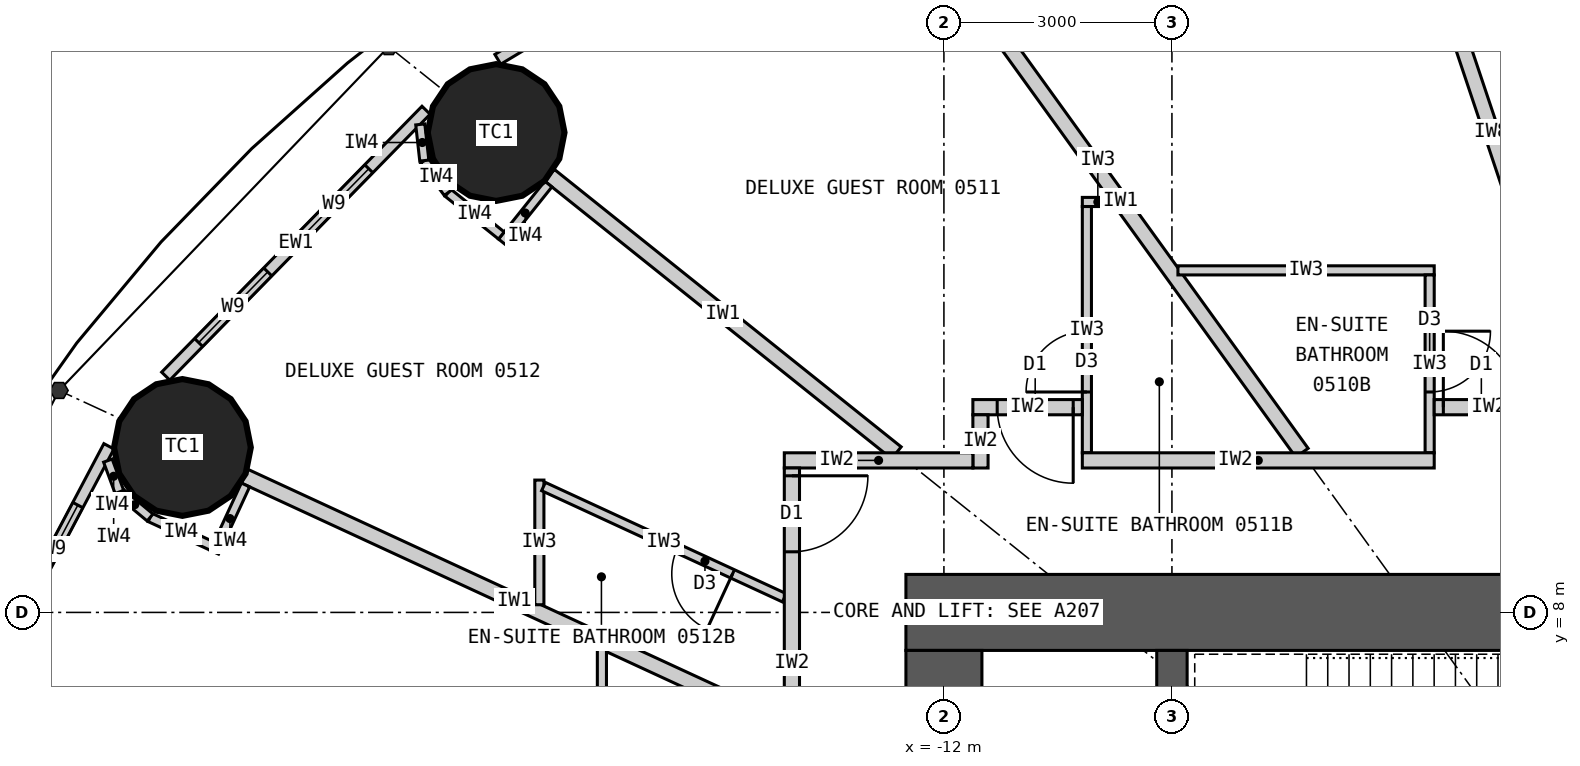
"""IFC4 building model, lengths in metres.
Left out: names, types, materials, properties, quantities, classifications, styles, units other than length and angle.
Written with IfcOpenShell. Run it as: python <this file> out.ifc"""

import sys

from ifc_helpers import new_model, si_unit, direction, frame, frame_2d, origin, origin_2d, place, context, subcontext, project, spatial, rectangle, circle, extrude, element, fill, save


model = new_model("IFC4")
c1 = context("Model", 3, precision=1e-05, world=origin(), true_north=direction((0.0, 1.0)))
c2 = subcontext(c1, "Body", "Model", "MODEL_VIEW")
j1 = project(units=[si_unit("LENGTHUNIT", "METRE"), si_unit("PLANEANGLEUNIT", "RADIAN")], contexts=[c1])
p1 = place(None, origin())
s1 = spatial("IfcSite", under=j1, at=p1, CompositionType="ELEMENT")
p2 = place(p1, origin())
s2 = spatial("IfcBuilding", under=s1, at=p2, CompositionType="ELEMENT")
p3 = place(p2, frame((0.0, 0.0, 29.4)))
s3 = spatial("IfcBuildingStorey", under=s2, at=p3, CompositionType="ELEMENT", Elevation=29.4)
for number, where, z_axis, x_axis in (
    (1, (-17.892, 14.313, 0.0), (0.0, 0.0, 1.0), (1.0, 0.0, 0.0)),
    (2, (-22.019, 10.17, 0.0), (0.0, 0.0, 1.0), (1.0, 0.0, 0.0)),
):
    element("IfcColumn", number, at=place(p3, frame(where, z_axis=z_axis, x_axis=x_axis)), inside=s3, PredefinedType="COLUMN", context=c2, shape_type="SweptSolid", body=[
        extrude(circle(Radius=0.9, at=origin_2d()), origin(), (0.0, 0.0, 1.0), 3.3),
    ])
p4 = place(p3, frame((-12.5, 8.0, 0.0), z_axis=(0.0, 0.0, 1.0), x_axis=(1.0, 0.0, 0.0)))
e3 = element("IfcWall", 3, at=p4, inside=s3, PredefinedType="SHEAR", context=c2, shape_type="SweptSolid", body=[
    extrude(rectangle(XDim=25.0, YDim=1.0, at=frame_2d((12.5, 0.0))), origin(), (0.0, 0.0, 1.0), 3.3),
])
p5 = place(p4, frame((11.2, 0.0, 0.0)))
e4 = element("IfcOpeningElement", 4, at=p5, cuts=e3, PredefinedType="OPENING", context=c2, shape_type="SweptSolid", body=[
    extrude(rectangle(XDim=1.2, YDim=2.2, at=frame_2d((0.6, 1.1))), frame((0.0, 0.51, 0.0), z_axis=(0.0, -1.0, 0.0), x_axis=(1.0, 0.0, 0.0)), (0.0, 0.0, 1.0), 1.02),
])
p6 = place(p4, frame((18.8, 0.0, 0.0)))
e5 = element("IfcOpeningElement", 5, at=p6, cuts=e3, PredefinedType="OPENING", context=c2, shape_type="SweptSolid", body=[
    extrude(rectangle(XDim=0.9, YDim=2.2, at=frame_2d((0.45, 1.1))), frame((0.0, 0.51, 0.0), z_axis=(0.0, -1.0, 0.0), x_axis=(1.0, 0.0, 0.0)), (0.0, 0.0, 1.0), 1.02),
])
p7 = place(p3, frame((-12.0, 7.5, 0.0), z_axis=(0.0, 0.0, 1.0), x_axis=(0.0, -1.0, 0.0)))
e6 = element("IfcWall", 6, at=p7, inside=s3, PredefinedType="SHEAR", context=c2, shape_type="SweptSolid", body=[
    extrude(rectangle(XDim=15.0, YDim=1.0, at=frame_2d((7.5, 0.0))), origin(), (0.0, 0.0, 1.0), 3.3),
])
p8 = place(p7, frame((6.6, 0.0, 0.0)))
e7 = element("IfcOpeningElement", 7, at=p8, cuts=e6, PredefinedType="OPENING", context=c2, shape_type="SweptSolid", body=[
    extrude(rectangle(XDim=1.8, YDim=2.2, at=frame_2d((0.9, 1.1))), frame((0.0, 0.51, 0.0), z_axis=(0.0, -1.0, 0.0), x_axis=(1.0, 0.0, 0.0)), (0.0, 0.0, 1.0), 1.02),
])
p9 = place(p3, frame((-9.0, 4.5, 0.0), z_axis=(0.0, 0.0, 1.0), x_axis=(0.0, 1.0, 0.0)))
e8 = element("IfcWall", 8, at=p9, inside=s3, PredefinedType="SHEAR", context=c2, shape_type="SweptSolid", body=[
    extrude(rectangle(XDim=3.0, YDim=0.4, at=frame_2d((1.5, 0.0))), origin(), (0.0, 0.0, 1.0), 3.3),
])
p10 = place(p3, frame((-13.412, 17.957, 0.0), z_axis=(0.0, 0.0, 1.0), x_axis=(-0.856958191554, -0.515385931054, 0.0)))
e9 = element("IfcWall", 9, at=p10, inside=s3, PredefinedType="ELEMENTEDWALL", context=c2, shape_type="SweptSolid", body=[
    extrude(rectangle(XDim=5.201, YDim=0.15, at=frame_2d((2.601, 0.0))), origin(), (0.0, 0.0, 1.0), 3.12),
])
p11 = place(p10, frame((1.225, 0.0, 0.9)))
e10 = element("IfcOpeningElement", 10, at=p11, cuts=e9, PredefinedType="OPENING", context=c2, shape_type="SweptSolid", body=[
    extrude(rectangle(XDim=1.3, YDim=1.9, at=frame_2d((0.65, 0.95))), frame((0.0, 0.085, 0.0), z_axis=(0.0, -1.0, 0.0), x_axis=(1.0, 0.0, 0.0)), (0.0, 0.0, 1.0), 0.17),
])
p12 = place(p10, frame((3.125, 0.0, 0.9)))
e11 = element("IfcOpeningElement", 11, at=p12, cuts=e9, PredefinedType="OPENING", context=c2, shape_type="SweptSolid", body=[
    extrude(rectangle(XDim=1.3, YDim=1.9, at=frame_2d((0.65, 0.95))), frame((0.0, 0.085, 0.0), z_axis=(0.0, -1.0, 0.0), x_axis=(1.0, 0.0, 0.0)), (0.0, 0.0, 1.0), 0.17),
])
p13 = place(p3, frame((-18.813, 14.607, 0.0), z_axis=(0.0, 0.0, 1.0), x_axis=(-0.699612594083, -0.714522370679, 0.0)))
e12 = element("IfcWall", 12, at=p13, inside=s3, PredefinedType="ELEMENTEDWALL", context=c2, shape_type="SweptSolid", body=[
    extrude(rectangle(XDim=4.896, YDim=0.15, at=frame_2d((2.448, 0.0))), origin(), (0.0, 0.0, 1.0), 3.12),
])
p14 = place(p13, frame((1.077, 0.0, 0.9)))
e13 = element("IfcOpeningElement", 13, at=p14, cuts=e12, PredefinedType="OPENING", context=c2, shape_type="SweptSolid", body=[
    extrude(rectangle(XDim=1.3, YDim=1.9, at=frame_2d((0.65, 0.95))), frame((0.0, 0.085, 0.0), z_axis=(0.0, -1.0, 0.0), x_axis=(1.0, 0.0, 0.0)), (0.0, 0.0, 1.0), 0.17),
])
p15 = place(p13, frame((2.977, 0.0, 0.9)))
e14 = element("IfcOpeningElement", 14, at=p15, cuts=e12, PredefinedType="OPENING", context=c2, shape_type="SweptSolid", body=[
    extrude(rectangle(XDim=1.3, YDim=1.9, at=frame_2d((0.65, 0.95))), frame((0.0, 0.085, 0.0), z_axis=(0.0, -1.0, 0.0), x_axis=(1.0, 0.0, 0.0)), (0.0, 0.0, 1.0), 0.17),
])
p16 = place(p3, frame((-22.986, 10.185, 0.0), z_axis=(0.0, 0.0, 1.0), x_axis=(-0.467303182954, -0.884097129959, 0.0)))
e15 = element("IfcWall", 15, at=p16, inside=s3, PredefinedType="ELEMENTEDWALL", context=c2, shape_type="SweptSolid", body=[
    extrude(rectangle(XDim=4.606, YDim=0.15, at=frame_2d((2.303, 0.0))), origin(), (0.0, 0.0, 1.0), 3.12),
])
p17 = place(p16, frame((0.875, 0.0, 0.9)))
e16 = element("IfcOpeningElement", 16, at=p17, cuts=e15, PredefinedType="OPENING", context=c2, shape_type="SweptSolid", body=[
    extrude(rectangle(XDim=1.3, YDim=1.9, at=frame_2d((0.65, 0.95))), frame((0.0, 0.085, 0.0), z_axis=(0.0, -1.0, 0.0), x_axis=(1.0, 0.0, 0.0)), (0.0, 0.0, 1.0), 0.17),
])
p18 = place(p16, frame((2.775, 0.0, 0.9)))
e17 = element("IfcOpeningElement", 17, at=p18, cuts=e15, PredefinedType="OPENING", context=c2, shape_type="SweptSolid", body=[
    extrude(rectangle(XDim=1.3, YDim=1.9, at=frame_2d((0.65, 0.95))), frame((0.0, 0.085, 0.0), z_axis=(0.0, -1.0, 0.0), x_axis=(1.0, 0.0, 0.0)), (0.0, 0.0, 1.0), 0.17),
])
p19 = place(p3, frame((-3.383, 10.1, 0.0), z_axis=(0.0, 0.0, 1.0), x_axis=(-0.317593727596, 0.948226884344, 0.0)))
e18 = element("IfcWall", 18, at=p19, inside=s3, PredefinedType="PARTITIONING", context=c2, shape_type="SweptSolid", body=[
    extrude(rectangle(XDim=8.899, YDim=0.2, at=frame_2d((4.449, 0.0))), origin(), (0.0, 0.0, 1.0), 2.32),
])
p20 = place(p3, frame((-7.289, 10.1, 0.0), z_axis=(0.0, 0.0, 1.0), x_axis=(-0.585216319319, 0.810877216108, 0.0)))
e19 = element("IfcWall", 19, at=p20, inside=s3, PredefinedType="PARTITIONING", context=c2, shape_type="SweptSolid", body=[
    extrude(rectangle(XDim=8.16, YDim=0.2, at=frame_2d((4.08, 0.0))), origin(), (0.0, 0.0, 1.0), 2.32),
])
p21 = place(p3, frame((-12.625, 10.1, 0.0), z_axis=(0.0, 0.0, 1.0), x_axis=(-0.780872884676, 0.624689953479, 0.0)))
e20 = element("IfcWall", 20, at=p21, inside=s3, PredefinedType="PARTITIONING", context=c2, shape_type="SweptSolid", body=[
    extrude(rectangle(XDim=5.845, YDim=0.2, at=frame_2d((2.922, 0.0))), origin(), (0.0, 0.0, 1.0), 2.32),
])
p22 = place(p3, frame((-14.1, 6.512, 0.0), z_axis=(0.0, 0.0, 1.0), x_axis=(-0.907842433118, 0.41931147925, 0.0)))
e21 = element("IfcWall", 21, at=p22, inside=s3, PredefinedType="PARTITIONING", context=c2, shape_type="SweptSolid", body=[
    extrude(rectangle(XDim=7.823, YDim=0.2, at=frame_2d((3.912, 0.0))), origin(), (0.0, 0.0, 1.0), 2.32),
])
p23 = place(p3, frame((-8.921, 12.5, 0.0), z_axis=(0.0, 0.0, 1.0), x_axis=(1.0, 0.0, 0.0)))
e22 = element("IfcWall", 22, at=p23, inside=s3, PredefinedType="PARTITIONING", context=c2, shape_type="SweptSolid", body=[
    extrude(rectangle(XDim=3.372, YDim=0.12, at=frame_2d((1.686, 0.0))), origin(), (0.0, 0.0, 1.0), 3.12),
])
p24 = place(p3, frame((-5.609, 10.1, 0.0), z_axis=(0.0, 0.0, 1.0), x_axis=(0.0, 1.0, 0.0)))
e23 = element("IfcWall", 23, at=p24, inside=s3, PredefinedType="PARTITIONING", context=c2, shape_type="SweptSolid", body=[
    extrude(rectangle(XDim=2.34, YDim=0.12, at=frame_2d((1.17, 0.0))), origin(), (0.0, 0.0, 1.0), 3.12),
])
p25 = place(p24, frame((0.8, 0.0, 0.0)))
e24 = element("IfcOpeningElement", 24, at=p25, cuts=e23, PredefinedType="OPENING", context=c2, shape_type="SweptSolid", body=[
    extrude(rectangle(XDim=0.8, YDim=2.1, at=frame_2d((0.4, 1.05))), frame((0.0, 0.07, 0.0), z_axis=(0.0, -1.0, 0.0), x_axis=(1.0, 0.0, 0.0)), (0.0, 0.0, 1.0), 0.14),
])
p26 = place(p3, frame((-9.771, 13.4, 0.0), z_axis=(0.0, 0.0, 1.0), x_axis=(-1.0, 0.0, 0.0)))
e25 = element("IfcWall", 25, at=p26, inside=s3, PredefinedType="PARTITIONING", context=c2, shape_type="SweptSolid", body=[
    extrude(rectangle(XDim=0.408, YDim=0.12, at=frame_2d((0.204, 0.0))), origin(), (0.0, 0.0, 1.0), 3.12),
])
p27 = place(p3, frame((-10.119, 10.1, 0.0), z_axis=(0.0, 0.0, 1.0), x_axis=(0.0, 1.0, 0.0)))
e26 = element("IfcWall", 26, at=p27, inside=s3, PredefinedType="PARTITIONING", context=c2, shape_type="SweptSolid", body=[
    extrude(rectangle(XDim=3.24, YDim=0.12, at=frame_2d((1.62, 0.0))), origin(), (0.0, 0.0, 1.0), 3.12),
])
p28 = place(p27, frame((0.8, 0.0, 0.0)))
e27 = element("IfcOpeningElement", 27, at=p28, cuts=e26, PredefinedType="OPENING", context=c2, shape_type="SweptSolid", body=[
    extrude(rectangle(XDim=0.8, YDim=2.1, at=frame_2d((0.4, 1.05))), frame((0.0, 0.07, 0.0), z_axis=(0.0, -1.0, 0.0), x_axis=(1.0, 0.0, 0.0)), (0.0, 0.0, 1.0), 0.14),
])
p29 = place(p3, frame((-17.323, 8.101, 0.0), z_axis=(0.0, 0.0, 1.0), x_axis=(0.0, 1.0, 0.0)))
e28 = element("IfcWall", 28, at=p29, inside=s3, PredefinedType="PARTITIONING", context=c2, shape_type="SweptSolid", body=[
    extrude(rectangle(XDim=1.64, YDim=0.12, at=frame_2d((0.82, 0.0))), origin(), (0.0, 0.0, 1.0), 3.12),
])
p30 = place(p3, frame((-14.1, 8.193, 0.0), z_axis=(0.0, 0.0, 1.0), x_axis=(-0.907836493557, 0.419324338628, 0.0)))
e29 = element("IfcWall", 29, at=p30, inside=s3, PredefinedType="PARTITIONING", context=c2, shape_type="SweptSolid", body=[
    extrude(rectangle(XDim=3.49, YDim=0.12, at=frame_2d((1.745, 0.0))), origin(), (0.0, 0.0, 1.0), 3.12),
])
p31 = place(p30, frame((0.75, 0.0, 0.0)))
e30 = element("IfcOpeningElement", 30, at=p31, cuts=e29, PredefinedType="OPENING", context=c2, shape_type="SweptSolid", body=[
    extrude(rectangle(XDim=0.8, YDim=2.1, at=frame_2d((0.4, 1.05))), frame((0.0, 0.07, 0.0), z_axis=(0.0, -1.0, 0.0), x_axis=(1.0, 0.0, 0.0)), (0.0, 0.0, 1.0), 0.14),
])
p32 = place(p3, frame((-16.5, 7.521, 0.0), z_axis=(0.0, 0.0, 1.0), x_axis=(0.0, -1.0, 0.0)))
e31 = element("IfcWall", 31, at=p32, inside=s3, PredefinedType="PARTITIONING", context=c2, shape_type="SweptSolid", body=[
    extrude(rectangle(XDim=2.749, YDim=0.12, at=frame_2d((1.374, 0.0))), origin(), (0.0, 0.0, 1.0), 3.12),
])
p33 = place(p3, frame((-5.549, 10.7, 0.0), z_axis=(0.0, 0.0, 1.0), x_axis=(1.0, 0.0, 0.0)))
e32 = element("IfcWall", 32, at=p33, inside=s3, PredefinedType="PARTITIONING", context=c2, shape_type="SweptSolid", body=[
    extrude(rectangle(XDim=1.44, YDim=0.2, at=frame_2d((0.72, 0.0))), origin(), (0.0, 0.0, 1.0), 3.12),
])
p34 = place(p33, frame((0.12, 0.0, 0.0)))
e33 = element("IfcOpeningElement", 33, at=p34, cuts=e32, PredefinedType="OPENING", context=c2, shape_type="SweptSolid", body=[
    extrude(rectangle(XDim=1.0, YDim=2.2, at=frame_2d((0.5, 1.1))), frame((0.0, 0.11, 0.0), z_axis=(0.0, -1.0, 0.0), x_axis=(1.0, 0.0, 0.0)), (0.0, 0.0, 1.0), 0.22),
])
p35 = place(p3, frame((-11.619, 10.7, 0.0), z_axis=(0.0, 0.0, 1.0), x_axis=(1.0, 0.0, 0.0)))
e34 = element("IfcWall", 34, at=p35, inside=s3, PredefinedType="PARTITIONING", context=c2, shape_type="SweptSolid", body=[
    extrude(rectangle(XDim=1.44, YDim=0.2, at=frame_2d((0.72, 0.0))), origin(), (0.0, 0.0, 1.0), 3.12),
])
p36 = place(p35, frame((0.32, 0.0, 0.0)))
e35 = element("IfcOpeningElement", 35, at=p36, cuts=e34, PredefinedType="OPENING", context=c2, shape_type="SweptSolid", body=[
    extrude(rectangle(XDim=1.0, YDim=2.2, at=frame_2d((0.5, 1.1))), frame((0.0, 0.11, 0.0), z_axis=(0.0, -1.0, 0.0), x_axis=(1.0, 0.0, 0.0)), (0.0, 0.0, 1.0), 0.22),
])
p37 = place(p3, frame((-11.519, 9.9, 0.0), z_axis=(0.0, 0.0, 1.0), x_axis=(0.0, 1.0, 0.0)))
e36 = element("IfcWall", 36, at=p37, inside=s3, PredefinedType="PARTITIONING", context=c2, shape_type="SweptSolid", body=[
    extrude(rectangle(XDim=0.7, YDim=0.2, at=frame_2d((0.35, 0.0))), origin(), (0.0, 0.0, 1.0), 3.12),
])
p38 = place(p3, frame((-14.1, 10.0, 0.0), z_axis=(0.0, 0.0, 1.0), x_axis=(1.0, 0.0, 0.0)))
e37 = element("IfcWall", 37, at=p38, inside=s3, PredefinedType="PARTITIONING", context=c2, shape_type="SweptSolid", body=[
    extrude(rectangle(XDim=2.481, YDim=0.2, at=frame_2d((1.24, 0.0))), origin(), (0.0, 0.0, 1.0), 3.12),
])
p39 = place(p3, frame((-10.179, 10.0, 0.0), z_axis=(0.0, 0.0, 1.0), x_axis=(1.0, 0.0, 0.0)))
e38 = element("IfcWall", 38, at=p39, inside=s3, PredefinedType="PARTITIONING", context=c2, shape_type="SweptSolid", body=[
    extrude(rectangle(XDim=4.63, YDim=0.2, at=frame_2d((2.315, 0.0))), origin(), (0.0, 0.0, 1.0), 3.12),
])
p40 = place(p3, frame((-14.0, 9.9, 0.0), z_axis=(0.0, 0.0, 1.0), x_axis=(0.0, -1.0, 0.0)))
e39 = element("IfcWall", 39, at=p40, inside=s3, PredefinedType="PARTITIONING", context=c2, shape_type="SweptSolid", body=[
    extrude(rectangle(XDim=5.127, YDim=0.2, at=frame_2d((2.564, 0.0))), origin(), (0.0, 0.0, 1.0), 3.12),
])
p41 = place(p40, frame((0.103, 0.0, 0.0)))
e40 = element("IfcOpeningElement", 40, at=p41, cuts=e39, PredefinedType="OPENING", context=c2, shape_type="SweptSolid", body=[
    extrude(rectangle(XDim=1.0, YDim=2.2, at=frame_2d((0.5, 1.1))), frame((0.0, 0.11, 0.0), z_axis=(0.0, -1.0, 0.0), x_axis=(1.0, 0.0, 0.0)), (0.0, 0.0, 1.0), 0.22),
])
p42 = place(p3, frame((-17.205, 13.635, 0.0), z_axis=(0.0, 0.0, 1.0), x_axis=(-0.624756144097, -0.780819928289, 0.0)))
e41 = element("IfcWall", 41, at=p42, inside=s3, PredefinedType="PARTITIONING", context=c2, shape_type="SweptSolid", body=[
    extrude(rectangle(XDim=0.975, YDim=0.12, at=frame_2d((0.487, 0.0))), origin(), (0.0, 0.0, 1.0), 3.12),
])
p43 = place(p3, frame((-17.823, 12.959, 0.0), z_axis=(0.0, 0.0, 1.0), x_axis=(-0.780895271023, 0.624661969144, 0.0)))
e42 = element("IfcWall", 42, at=p43, inside=s3, PredefinedType="PARTITIONING", context=c2, shape_type="SweptSolid", body=[
    extrude(rectangle(XDim=0.9, YDim=0.12, at=frame_2d((0.45, 0.0))), origin(), (0.0, 0.0, 1.0), 3.12),
])
p44 = place(p3, frame((-18.526, 13.521, 0.0), z_axis=(0.0, 0.0, 1.0), x_axis=(-0.592532503205, 0.805546542818, 0.0)))
e43 = element("IfcWall", 43, at=p44, inside=s3, PredefinedType="PARTITIONING", context=c2, shape_type="SweptSolid", body=[
    extrude(rectangle(XDim=0.525, YDim=0.12, at=frame_2d((0.262, 0.0))), origin(), (0.0, 0.0, 1.0), 3.12),
])
p45 = place(p3, frame((-18.837, 13.944, 0.0), z_axis=(0.0, 0.0, 1.0), x_axis=(-0.110543348478, 0.993871303594, 0.0)))
e44 = element("IfcWall", 44, at=p45, inside=s3, PredefinedType="PARTITIONING", context=c2, shape_type="SweptSolid", body=[
    extrude(rectangle(XDim=0.479, YDim=0.12, at=frame_2d((0.24, 0.0))), origin(), (0.0, 0.0, 1.0), 3.12),
])
p46 = place(p3, frame((-21.189, 9.677, 0.0), z_axis=(0.0, 0.0, 1.0), x_axis=(-0.419344098106, -0.907827366509, 0.0)))
e45 = element("IfcWall", 45, at=p46, inside=s3, PredefinedType="PARTITIONING", context=c2, shape_type="SweptSolid", body=[
    extrude(rectangle(XDim=0.975, YDim=0.12, at=frame_2d((0.487, 0.0))), origin(), (0.0, 0.0, 1.0), 3.12),
])
p47 = place(p3, frame((-21.627, 8.872, 0.0), z_axis=(0.0, 0.0, 1.0), x_axis=(-0.907935564339, 0.419109783957, 0.0)))
e46 = element("IfcWall", 46, at=p47, inside=s3, PredefinedType="PARTITIONING", context=c2, shape_type="SweptSolid", body=[
    extrude(rectangle(XDim=0.9, YDim=0.12, at=frame_2d((0.45, 0.0))), origin(), (0.0, 0.0, 1.0), 3.12),
])
p48 = place(p3, frame((-22.445, 9.249, 0.0), z_axis=(0.0, 0.0, 1.0), x_axis=(-0.768335565584, 0.640047231584, 0.0)))
e47 = element("IfcWall", 47, at=p48, inside=s3, PredefinedType="PARTITIONING", context=c2, shape_type="SweptSolid", body=[
    extrude(rectangle(XDim=0.525, YDim=0.12, at=frame_2d((0.263, 0.0))), origin(), (0.0, 0.0, 1.0), 3.12),
])
p49 = place(p3, frame((-22.848, 9.585, 0.0), z_axis=(0.0, 0.0, 1.0), x_axis=(-0.345267312673, 0.938504386138, 0.0)))
e48 = element("IfcWall", 48, at=p49, inside=s3, PredefinedType="PARTITIONING", context=c2, shape_type="SweptSolid", body=[
    extrude(rectangle(XDim=0.439, YDim=0.12, at=frame_2d((0.22, 0.0))), origin(), (0.0, 0.0, 1.0), 3.12),
])
p50 = place(p14, origin())
e49 = element("IfcWindow", 49, at=p50, inside=s3, PartitioningType="SINGLE_PANEL", PredefinedType="WINDOW", context=c2, shape_type="SweptSolid", body=[
    extrude(rectangle(XDim=1.3, YDim=1.9, at=frame_2d((0.65, 0.95))), frame((0.0, 0.03, 0.0), z_axis=(0.0, -1.0, 0.0), x_axis=(1.0, 0.0, 0.0)), (0.0, 0.0, 1.0), 0.06),
])
fill(e13, e49)
p51 = place(p15, origin())
e50 = element("IfcWindow", 50, at=p51, inside=s3, PartitioningType="SINGLE_PANEL", PredefinedType="WINDOW", context=c2, shape_type="SweptSolid", body=[
    extrude(rectangle(XDim=1.3, YDim=1.9, at=frame_2d((0.65, 0.95))), frame((0.0, 0.03, 0.0), z_axis=(0.0, -1.0, 0.0), x_axis=(1.0, 0.0, 0.0)), (0.0, 0.0, 1.0), 0.06),
])
fill(e14, e50)
p52 = place(p17, origin())
e51 = element("IfcWindow", 51, at=p52, inside=s3, PartitioningType="SINGLE_PANEL", PredefinedType="WINDOW", context=c2, shape_type="SweptSolid", body=[
    extrude(rectangle(XDim=1.3, YDim=1.9, at=frame_2d((0.65, 0.95))), frame((0.0, 0.03, 0.0), z_axis=(0.0, -1.0, 0.0), x_axis=(1.0, 0.0, 0.0)), (0.0, 0.0, 1.0), 0.06),
])
fill(e16, e51)
p53 = place(p25, origin())
e52 = element("IfcDoor", 52, at=p53, inside=s3, OperationType="SINGLE_SWING_RIGHT", PredefinedType="DOOR", context=c2, shape_type="SweptSolid", body=[
    extrude(rectangle(XDim=0.8, YDim=2.1, at=frame_2d((0.4, 1.05))), frame((0.0, 0.025, 0.0), z_axis=(0.0, -1.0, 0.0), x_axis=(1.0, 0.0, 0.0)), (0.0, 0.0, 1.0), 0.05),
])
fill(e24, e52)
p54 = place(p34, origin())
e53 = element("IfcDoor", 53, at=p54, inside=s3, OperationType="SINGLE_SWING_LEFT", PredefinedType="DOOR", context=c2, shape_type="SweptSolid", body=[
    extrude(rectangle(XDim=1.0, YDim=2.2, at=frame_2d((0.5, 1.1))), frame((0.0, 0.025, 0.0), z_axis=(0.0, -1.0, 0.0), x_axis=(1.0, 0.0, 0.0)), (0.0, 0.0, 1.0), 0.05),
])
fill(e33, e53)
p55 = place(p28, origin())
e54 = element("IfcDoor", 54, at=p55, inside=s3, OperationType="SINGLE_SWING_LEFT", PredefinedType="DOOR", context=c2, shape_type="SweptSolid", body=[
    extrude(rectangle(XDim=0.8, YDim=2.1, at=frame_2d((0.4, 1.05))), frame((0.0, 0.025, 0.0), z_axis=(0.0, -1.0, 0.0), x_axis=(1.0, 0.0, 0.0)), (0.0, 0.0, 1.0), 0.05),
])
fill(e27, e54)
p56 = place(p36, origin())
e55 = element("IfcDoor", 55, at=p56, inside=s3, OperationType="SINGLE_SWING_RIGHT", PredefinedType="DOOR", context=c2, shape_type="SweptSolid", body=[
    extrude(rectangle(XDim=1.0, YDim=2.2, at=frame_2d((0.5, 1.1))), frame((0.0, 0.025, 0.0), z_axis=(0.0, -1.0, 0.0), x_axis=(1.0, 0.0, 0.0)), (0.0, 0.0, 1.0), 0.05),
])
fill(e35, e55)
p57 = place(p31, origin())
e56 = element("IfcDoor", 56, at=p57, inside=s3, OperationType="SINGLE_SWING_LEFT", PredefinedType="DOOR", context=c2, shape_type="SweptSolid", body=[
    extrude(rectangle(XDim=0.8, YDim=2.1, at=frame_2d((0.4, 1.05))), frame((0.0, 0.025, 0.0), z_axis=(0.0, -1.0, 0.0), x_axis=(1.0, 0.0, 0.0)), (0.0, 0.0, 1.0), 0.05),
])
fill(e30, e56)
p58 = place(p41, origin())
e57 = element("IfcDoor", 57, at=p58, inside=s3, OperationType="SINGLE_SWING_LEFT", PredefinedType="DOOR", context=c2, shape_type="SweptSolid", body=[
    extrude(rectangle(XDim=1.0, YDim=2.2, at=frame_2d((0.5, 1.1))), frame((0.0, 0.025, 0.0), z_axis=(0.0, -1.0, 0.0), x_axis=(1.0, 0.0, 0.0)), (0.0, 0.0, 1.0), 0.05),
])
fill(e40, e57)
save(model, sys.argv[1])
